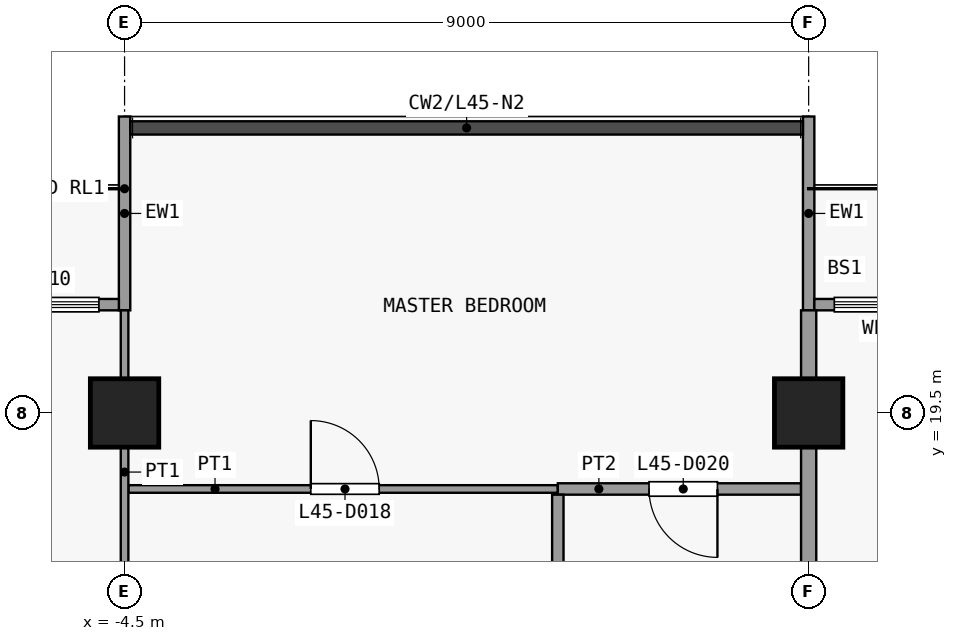
"""IFC4 building model, lengths in metres.
Left out: names, types, materials, properties, quantities, classifications, styles, units other than length and angle.
Written with IfcOpenShell. Run it as: python <this file> out.ifc"""

import sys

from ifc_helpers import new_model, si_unit, direction, frame, frame_2d, origin, origin_2d, place, context, subcontext, project, spatial, rectangle, extrude, element, fill, save


model = new_model("IFC4")
c1 = context("Model", 3, precision=1e-05, world=origin(), true_north=direction((0.0, 1.0)))
c2 = subcontext(c1, "Body", "Model", "MODEL_VIEW")
j1 = project(units=[si_unit("LENGTHUNIT", "METRE"), si_unit("PLANEANGLEUNIT", "RADIAN")], contexts=[c1])
p1 = place(None, origin())
s1 = spatial("IfcSite", under=j1, at=p1, CompositionType="ELEMENT")
p2 = place(p1, origin())
s2 = spatial("IfcBuilding", under=s1, at=p2, CompositionType="ELEMENT")
p3 = place(p2, frame((0.0, 0.0, 181.7)))
s3 = spatial("IfcBuildingStorey", under=s2, at=p3, CompositionType="ELEMENT", Elevation=181.7)
for number, where, z_axis, x_axis in (
    (1, (-4.5, 19.5, 0.0), (0.0, 0.0, 1.0), (1.0, 0.0, 0.0)),
    (2, (4.5, 19.5, 0.0), (0.0, 0.0, 1.0), (1.0, 0.0, 0.0)),
):
    element("IfcColumn", number, at=place(p3, frame(where, z_axis=z_axis, x_axis=x_axis)), inside=s3, PredefinedType="COLUMN", context=c2, shape_type="SweptSolid", body=[
        extrude(rectangle(XDim=0.9, YDim=0.9, at=origin_2d()), origin(), (0.0, 0.0, 1.0), 3.6),
    ])
p4 = place(p3, frame((-4.5, 20.85, 0.0), z_axis=(0.0, 0.0, 1.0), x_axis=(0.0, 1.0, 0.0)))
e3 = element("IfcWall", 3, at=p4, inside=s3, PredefinedType="SOLIDWALL", context=c2, shape_type="SweptSolid", body=[
    extrude(rectangle(XDim=2.55, YDim=0.15, at=frame_2d((1.275, 0.0))), origin(), (0.0, 0.0, 1.0), 3.3),
])
p5 = place(p3, frame((-10.425, 20.925, 0.0), z_axis=(0.0, 0.0, 1.0), x_axis=(1.0, 0.0, 0.0)))
e4 = element("IfcWall", 4, at=p5, inside=s3, PredefinedType="SOLIDWALL", context=c2, shape_type="SweptSolid", body=[
    extrude(rectangle(XDim=5.85, YDim=0.15, at=frame_2d((2.925, 0.0))), origin(), (0.0, 0.0, 1.0), 3.3),
])
p6 = place(p5, frame((2.325, 0.0, 0.0)))
e5 = element("IfcOpeningElement", 5, at=p6, cuts=e4, PredefinedType="OPENING", context=c2, shape_type="SweptSolid", body=[
    extrude(rectangle(XDim=1.2, YDim=2.4, at=frame_2d((0.6, 1.2))), frame((0.0, 0.085, 0.0), z_axis=(0.0, -1.0, 0.0), x_axis=(1.0, 0.0, 0.0)), (0.0, 0.0, 1.0), 0.17),
])
p7 = place(p5, frame((0.262, 0.0, 0.9)))
e6 = element("IfcOpeningElement", 6, at=p7, cuts=e4, PredefinedType="OPENING", context=c2, shape_type="SweptSolid", body=[
    extrude(rectangle(XDim=1.8, YDim=2.1, at=frame_2d((0.9, 1.05))), frame((0.0, 0.085, 0.0), z_axis=(0.0, -1.0, 0.0), x_axis=(1.0, 0.0, 0.0)), (0.0, 0.0, 1.0), 0.17),
])
p8 = place(p5, frame((3.788, 0.0, 0.9)))
e7 = element("IfcOpeningElement", 7, at=p8, cuts=e4, PredefinedType="OPENING", context=c2, shape_type="SweptSolid", body=[
    extrude(rectangle(XDim=1.8, YDim=2.1, at=frame_2d((0.9, 1.05))), frame((0.0, 0.085, 0.0), z_axis=(0.0, -1.0, 0.0), x_axis=(1.0, 0.0, 0.0)), (0.0, 0.0, 1.0), 0.17),
])
p9 = place(p3, frame((4.5, 20.85, 0.0), z_axis=(0.0, 0.0, 1.0), x_axis=(0.0, 1.0, 0.0)))
e8 = element("IfcWall", 8, at=p9, inside=s3, PredefinedType="SOLIDWALL", context=c2, shape_type="SweptSolid", body=[
    extrude(rectangle(XDim=2.55, YDim=0.15, at=frame_2d((1.275, 0.0))), origin(), (0.0, 0.0, 1.0), 3.3),
])
p10 = place(p3, frame((4.575, 20.925, 0.0), z_axis=(0.0, 0.0, 1.0), x_axis=(1.0, 0.0, 0.0)))
e9 = element("IfcWall", 9, at=p10, inside=s3, PredefinedType="SOLIDWALL", context=c2, shape_type="SweptSolid", body=[
    extrude(rectangle(XDim=5.85, YDim=0.15, at=frame_2d((2.925, 0.0))), origin(), (0.0, 0.0, 1.0), 3.3),
])
p11 = place(p10, frame((2.325, 0.0, 0.0)))
e10 = element("IfcOpeningElement", 10, at=p11, cuts=e9, PredefinedType="OPENING", context=c2, shape_type="SweptSolid", body=[
    extrude(rectangle(XDim=1.2, YDim=2.4, at=frame_2d((0.6, 1.2))), frame((0.0, 0.085, 0.0), z_axis=(0.0, -1.0, 0.0), x_axis=(1.0, 0.0, 0.0)), (0.0, 0.0, 1.0), 0.17),
])
p12 = place(p10, frame((0.262, 0.0, 0.9)))
e11 = element("IfcOpeningElement", 11, at=p12, cuts=e9, PredefinedType="OPENING", context=c2, shape_type="SweptSolid", body=[
    extrude(rectangle(XDim=1.8, YDim=2.1, at=frame_2d((0.9, 1.05))), frame((0.0, 0.085, 0.0), z_axis=(0.0, -1.0, 0.0), x_axis=(1.0, 0.0, 0.0)), (0.0, 0.0, 1.0), 0.17),
])
p13 = place(p10, frame((3.788, 0.0, 0.9)))
e12 = element("IfcOpeningElement", 12, at=p13, cuts=e9, PredefinedType="OPENING", context=c2, shape_type="SweptSolid", body=[
    extrude(rectangle(XDim=1.8, YDim=2.1, at=frame_2d((0.9, 1.05))), frame((0.0, 0.085, 0.0), z_axis=(0.0, -1.0, 0.0), x_axis=(1.0, 0.0, 0.0)), (0.0, 0.0, 1.0), 0.17),
])
p14 = place(p3, frame((-4.45, 18.5, 0.0), z_axis=(0.0, 0.0, 1.0), x_axis=(1.0, 0.0, 0.0)))
e13 = element("IfcWall", 13, at=p14, inside=s3, PredefinedType="PARTITIONING", context=c2, shape_type="SweptSolid", body=[
    extrude(rectangle(XDim=5.65, YDim=0.1, at=frame_2d((2.825, 0.0))), origin(), (0.0, 0.0, 1.0), 3.3),
])
p15 = place(p14, frame((2.4, 0.0, 0.0)))
e14 = element("IfcOpeningElement", 14, at=p15, cuts=e13, PredefinedType="OPENING", context=c2, shape_type="SweptSolid", body=[
    extrude(rectangle(XDim=0.9, YDim=2.1, at=frame_2d((0.45, 1.05))), frame((0.0, 0.06, 0.0), z_axis=(0.0, -1.0, 0.0), x_axis=(1.0, 0.0, 0.0)), (0.0, 0.0, 1.0), 0.12),
])
p16 = place(p3, frame((1.2, 18.5, 0.0), z_axis=(0.0, 0.0, 1.0), x_axis=(1.0, 0.0, 0.0)))
e15 = element("IfcWall", 15, at=p16, inside=s3, PredefinedType="PARTITIONING", context=c2, shape_type="SweptSolid", body=[
    extrude(rectangle(XDim=3.2, YDim=0.15, at=frame_2d((1.6, 0.0))), origin(), (0.0, 0.0, 1.0), 3.3),
])
p17 = place(p16, frame((1.2, 0.0, 0.0)))
e16 = element("IfcOpeningElement", 16, at=p17, cuts=e15, PredefinedType="OPENING", context=c2, shape_type="SweptSolid", body=[
    extrude(rectangle(XDim=0.9, YDim=2.1, at=frame_2d((0.45, 1.05))), frame((0.0, 0.085, 0.0), z_axis=(0.0, -1.0, 0.0), x_axis=(1.0, 0.0, 0.0)), (0.0, 0.0, 1.0), 0.17),
])
p18 = place(p3, frame((-4.5, 13.575, 0.0), z_axis=(0.0, 0.0, 1.0), x_axis=(0.0, 1.0, 0.0)))
e17 = element("IfcWall", 17, at=p18, inside=s3, PredefinedType="PARTITIONING", context=c2, shape_type="SweptSolid", body=[
    extrude(rectangle(XDim=7.275, YDim=0.1, at=frame_2d((3.638, 0.0))), origin(), (0.0, 0.0, 1.0), 3.3),
])
p19 = place(p18, frame((2.0, 0.0, 0.0)))
e18 = element("IfcOpeningElement", 18, at=p19, cuts=e17, PredefinedType="OPENING", context=c2, shape_type="SweptSolid", body=[
    extrude(rectangle(XDim=0.9, YDim=2.1, at=frame_2d((0.45, 1.05))), frame((0.0, 0.06, 0.0), z_axis=(0.0, -1.0, 0.0), x_axis=(1.0, 0.0, 0.0)), (0.0, 0.0, 1.0), 0.12),
])
p20 = place(p3, frame((1.2, 13.575, 0.0), z_axis=(0.0, 0.0, 1.0), x_axis=(0.0, 1.0, 0.0)))
e19 = element("IfcWall", 19, at=p20, inside=s3, PredefinedType="PARTITIONING", context=c2, shape_type="SweptSolid", body=[
    extrude(rectangle(XDim=4.85, YDim=0.15, at=frame_2d((2.425, 0.0))), origin(), (0.0, 0.0, 1.0), 3.3),
])
p21 = place(p3, frame((4.5, 13.575, 0.0), z_axis=(0.0, 0.0, 1.0), x_axis=(0.0, 1.0, 0.0)))
e20 = element("IfcWall", 20, at=p21, inside=s3, PredefinedType="PARTITIONING", context=c2, shape_type="SweptSolid", body=[
    extrude(rectangle(XDim=7.275, YDim=0.2, at=frame_2d((3.638, 0.0))), origin(), (0.0, 0.0, 1.0), 3.3),
])
p22 = place(p8, origin())
e21 = element("IfcWindow", 21, at=p22, inside=s3, PartitioningType="SINGLE_PANEL", PredefinedType="WINDOW", context=c2, shape_type="SweptSolid", body=[
    extrude(rectangle(XDim=1.8, YDim=2.1, at=frame_2d((0.9, 1.05))), frame((0.0, 0.03, 0.0), z_axis=(0.0, -1.0, 0.0), x_axis=(1.0, 0.0, 0.0)), (0.0, 0.0, 1.0), 0.06),
])
fill(e7, e21)
p23 = place(p12, origin())
e22 = element("IfcWindow", 22, at=p23, inside=s3, PartitioningType="SINGLE_PANEL", PredefinedType="WINDOW", context=c2, shape_type="SweptSolid", body=[
    extrude(rectangle(XDim=1.8, YDim=2.1, at=frame_2d((0.9, 1.05))), frame((0.0, 0.03, 0.0), z_axis=(0.0, -1.0, 0.0), x_axis=(1.0, 0.0, 0.0)), (0.0, 0.0, 1.0), 0.06),
])
fill(e11, e22)
p24 = place(p15, origin())
e23 = element("IfcDoor", 23, at=p24, inside=s3, OperationType="SINGLE_SWING_RIGHT", PredefinedType="DOOR", context=c2, shape_type="SweptSolid", body=[
    extrude(rectangle(XDim=0.9, YDim=2.1, at=frame_2d((0.45, 1.05))), frame((0.0, 0.025, 0.0), z_axis=(0.0, -1.0, 0.0), x_axis=(1.0, 0.0, 0.0)), (0.0, 0.0, 1.0), 0.05),
])
fill(e14, e23)
p25 = place(p17, origin())
e24 = element("IfcDoor", 24, at=p25, inside=s3, OperationType="SINGLE_SWING_RIGHT", PredefinedType="DOOR", context=c2, shape_type="SweptSolid", body=[
    extrude(rectangle(XDim=0.9, YDim=2.1, at=frame_2d((0.45, 1.05))), frame((0.0, 0.025, 0.0), z_axis=(0.0, -1.0, 0.0), x_axis=(1.0, 0.0, 0.0)), (0.0, 0.0, 1.0), 0.05),
])
fill(e16, e24)
save(model, sys.argv[1])
